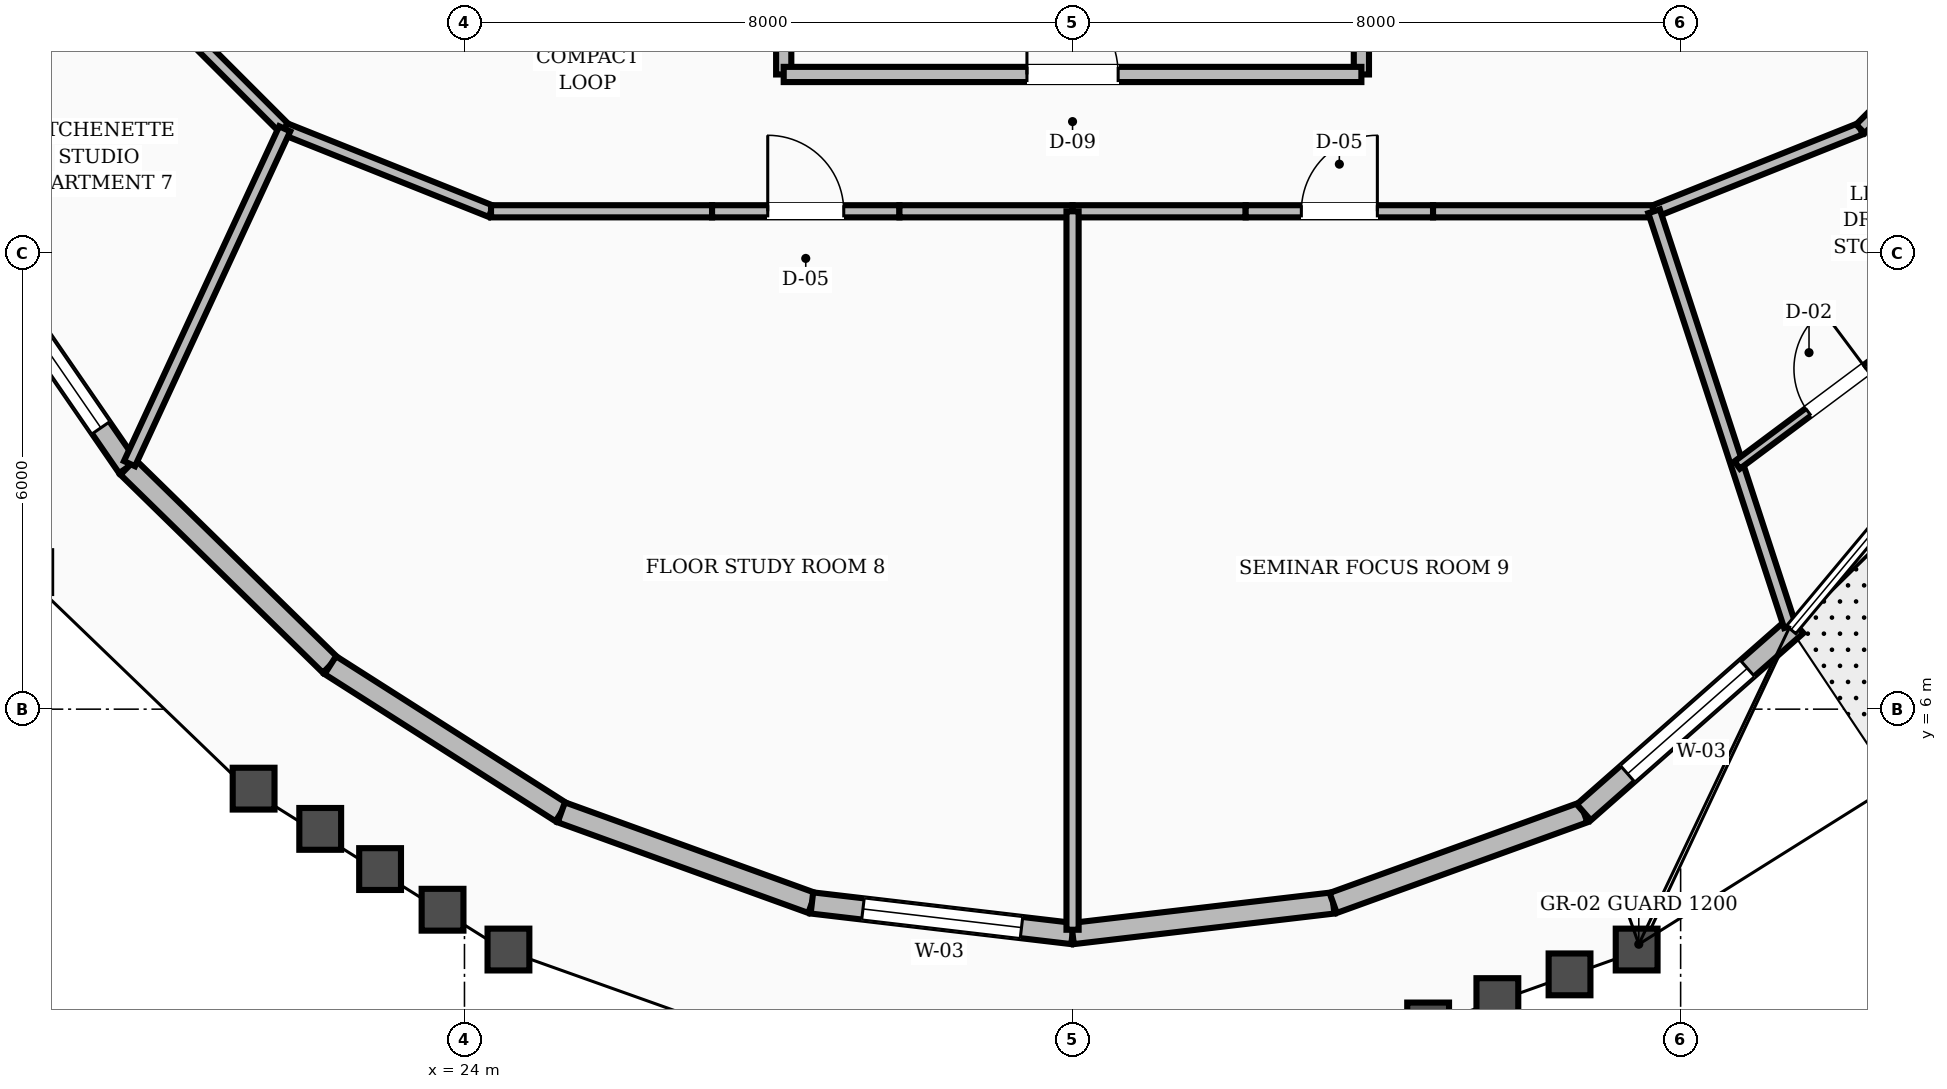
"""IFC4 building model, lengths in metres.
Left out: names, types, materials, properties, quantities, classifications, styles, units other than length and angle.
Written with IfcOpenShell. Run it as: python <this file> out.ifc"""

import sys

from ifc_helpers import new_model, si_unit, direction, frame, frame_2d, origin, place, context, subcontext, project, spatial, rectangle, extrude, element, fill, save


model = new_model("IFC4")
c1 = context("Model", 3, precision=1e-05, world=origin(), true_north=direction((0.0, 1.0)))
c2 = subcontext(c1, "Body", "Model", "MODEL_VIEW")
j1 = project(units=[si_unit("LENGTHUNIT", "METRE"), si_unit("PLANEANGLEUNIT", "RADIAN")], contexts=[c1])
p1 = place(None, origin())
s1 = spatial("IfcSite", under=j1, at=p1, CompositionType="ELEMENT")
p2 = place(p1, origin())
s2 = spatial("IfcBuilding", under=s1, at=p2, CompositionType="ELEMENT")
p3 = place(p2, frame((0.0, 0.0, 294.0)))
s3 = spatial("IfcBuildingStorey", under=s2, at=p3, CompositionType="ELEMENT", Elevation=294.0)
p4 = place(p3, frame((17.386, 12.36, 0.0), z_axis=(0.0, 0.0, 1.0), x_axis=(0.567090463347, -0.823655514388, 0.0)))
e1 = element("IfcWall", 1, at=p4, inside=s3, PredefinedType="STANDARD", context=c2, shape_type="SweptSolid", body=[
    extrude(rectangle(XDim=3.855, YDim=0.28, at=frame_2d((1.927, 0.0))), origin(), (0.0, 0.0, 1.0), 2.82),
])
p5 = place(p4, frame((0.627, 0.0, 0.8)))
e2 = element("IfcOpeningElement", 2, at=p5, cuts=e1, PredefinedType="OPENING", context=c2, shape_type="SweptSolid", body=[
    extrude(rectangle(XDim=2.6, YDim=1.65, at=frame_2d((1.3, 0.825))), frame((0.0, 0.15, 0.0), z_axis=(0.0, -1.0, 0.0), x_axis=(1.0, 0.0, 0.0)), (0.0, 0.0, 1.0), 0.3),
])
p6 = place(p3, frame((19.572, 9.185, 0.0), z_axis=(0.0, 0.0, 1.0), x_axis=(0.714829041056, -0.699299250724, 0.0)))
e3 = element("IfcWall", 3, at=p6, inside=s3, PredefinedType="STANDARD", context=c2, shape_type="SweptSolid", body=[
    extrude(rectangle(XDim=3.726, YDim=0.28, at=frame_2d((1.863, 0.0))), origin(), (0.0, 0.0, 1.0), 2.82),
])
p7 = place(p3, frame((22.235, 6.579, 0.0), z_axis=(0.0, 0.0, 1.0), x_axis=(0.843329306989, -0.537397134319, 0.0)))
e4 = element("IfcWall", 4, at=p7, inside=s3, PredefinedType="STANDARD", context=c2, shape_type="SweptSolid", body=[
    extrude(rectangle(XDim=3.603, YDim=0.28, at=frame_2d((1.802, 0.0))), origin(), (0.0, 0.0, 1.0), 2.82),
])
p8 = place(p3, frame((25.274, 4.643, 0.0), z_axis=(0.0, 0.0, 1.0), x_axis=(0.940393758193, -0.340087605703, 0.0)))
e5 = element("IfcWall", 5, at=p8, inside=s3, PredefinedType="STANDARD", context=c2, shape_type="SweptSolid", body=[
    extrude(rectangle(XDim=3.506, YDim=0.28, at=frame_2d((1.753, 0.0))), origin(), (0.0, 0.0, 1.0), 2.82),
])
p9 = place(p3, frame((28.571, 3.45, 0.0), z_axis=(0.0, 0.0, 1.0), x_axis=(0.993178090084, -0.116607381314, 0.0)))
e6 = element("IfcWall", 6, at=p9, inside=s3, PredefinedType="STANDARD", context=c2, shape_type="SweptSolid", body=[
    extrude(rectangle(XDim=3.452, YDim=0.28, at=frame_2d((1.726, 0.0))), origin(), (0.0, 0.0, 1.0), 2.82),
])
p10 = place(p9, frame((0.676, 0.0, 0.8)))
e7 = element("IfcOpeningElement", 7, at=p10, cuts=e6, PredefinedType="OPENING", context=c2, shape_type="SweptSolid", body=[
    extrude(rectangle(XDim=2.1, YDim=1.65, at=frame_2d((1.05, 0.825))), frame((0.0, 0.15, 0.0), z_axis=(0.0, -1.0, 0.0), x_axis=(1.0, 0.0, 0.0)), (0.0, 0.0, 1.0), 0.3),
])
p11 = place(p3, frame((32.0, 3.048, 0.0), z_axis=(0.0, 0.0, 1.0), x_axis=(0.993178090084, 0.116607381314, 0.0)))
e8 = element("IfcWall", 8, at=p11, inside=s3, PredefinedType="STANDARD", context=c2, shape_type="SweptSolid", body=[
    extrude(rectangle(XDim=3.452, YDim=0.28, at=frame_2d((1.726, 0.0))), origin(), (0.0, 0.0, 1.0), 2.82),
])
p12 = place(p3, frame((35.429, 3.45, 0.0), z_axis=(0.0, 0.0, 1.0), x_axis=(0.940393758193, 0.340087605703, 0.0)))
e9 = element("IfcWall", 9, at=p12, inside=s3, PredefinedType="STANDARD", context=c2, shape_type="SweptSolid", body=[
    extrude(rectangle(XDim=3.506, YDim=0.28, at=frame_2d((1.753, 0.0))), origin(), (0.0, 0.0, 1.0), 2.82),
])
p13 = place(p3, frame((38.726, 4.643, 0.0), z_axis=(0.0, 0.0, 1.0), x_axis=(0.75049902536, 0.660871555549, 0.0)))
e10 = element("IfcWall", 10, at=p13, inside=s3, PredefinedType="STANDARD", context=c2, shape_type="SweptSolid", body=[
    extrude(rectangle(XDim=3.726, YDim=0.28, at=frame_2d((1.863, 0.0))), origin(), (0.0, 0.0, 1.0), 2.82),
])
p14 = place(p13, frame((0.767, 0.0, 0.8)))
e11 = element("IfcOpeningElement", 11, at=p14, cuts=e10, PredefinedType="OPENING", context=c2, shape_type="SweptSolid", body=[
    extrude(rectangle(XDim=2.1, YDim=1.65, at=frame_2d((1.05, 0.825))), frame((0.0, 0.15, 0.0), z_axis=(0.0, -1.0, 0.0), x_axis=(1.0, 0.0, 0.0)), (0.0, 0.0, 1.0), 0.3),
])
for number, where, z_axis, x_axis in (
    (12, (28.2, 14.35, 0.0), (0.0, 0.0, 1.0), (0.0, 1.0, 0.0)),
    (13, (35.8, 14.35, 0.0), (0.0, 0.0, 1.0), (0.0, 1.0, 0.0)),
):
    element("IfcWall", number, at=place(p3, frame(where, z_axis=z_axis, x_axis=x_axis)), inside=s3, PredefinedType="SOLIDWALL", context=c2, shape_type="SweptSolid", body=[
        extrude(rectangle(XDim=2.2, YDim=0.2, at=frame_2d((1.1, 0.0))), origin(), (0.0, 0.0, 1.0), 2.81),
    ])
p15 = place(p3, frame((28.2, 14.35, 0.0), z_axis=(0.0, 0.0, 1.0), x_axis=(1.0, 0.0, 0.0)))
e14 = element("IfcWall", 14, at=p15, inside=s3, PredefinedType="SOLIDWALL", context=c2, shape_type="SweptSolid", body=[
    extrude(rectangle(XDim=7.6, YDim=0.2, at=frame_2d((3.8, 0.0))), origin(), (0.0, 0.0, 1.0), 2.81),
])
p16 = place(p15, frame((3.2, 0.0, 0.0)))
e15 = element("IfcOpeningElement", 15, at=p16, cuts=e14, PredefinedType="OPENING", context=c2, shape_type="SweptSolid", body=[
    extrude(rectangle(XDim=1.2, YDim=2.1, at=frame_2d((0.6, 1.05))), frame((0.0, 0.11, 0.0), z_axis=(0.0, -1.0, 0.0), x_axis=(1.0, 0.0, 0.0)), (0.0, 0.0, 1.0), 0.22),
])
p17 = place(p3, frame((19.573, 15.697, 0.0), z_axis=(0.0, 0.0, 1.0), x_axis=(0.707106781187, -0.707106781187, 0.0)))
e16 = element("IfcWall", 16, at=p17, inside=s3, PredefinedType="SOLIDWALL", context=c2, shape_type="SweptSolid", body=[
    extrude(rectangle(XDim=2.916, YDim=0.16, at=frame_2d((1.458, 0.0))), origin(), (0.0, 0.0, 1.0), 2.81),
])
p18 = place(p3, frame((21.635, 13.635, 0.0), z_axis=(0.0, 0.0, 1.0), x_axis=(0.92856882165, -0.371160266542, 0.0)))
e17 = element("IfcWall", 17, at=p18, inside=s3, PredefinedType="SOLIDWALL", context=c2, shape_type="SweptSolid", body=[
    extrude(rectangle(XDim=2.923, YDim=0.16, at=frame_2d((1.461, 0.0))), origin(), (0.0, 0.0, 1.0), 2.81),
])
p19 = place(p3, frame((24.349, 12.55, 0.0), z_axis=(0.0, 0.0, 1.0), x_axis=(1.0, 0.0, 0.0)))
e18 = element("IfcWall", 18, at=p19, inside=s3, PredefinedType="SOLIDWALL", context=c2, shape_type="SweptSolid", body=[
    extrude(rectangle(XDim=2.908, YDim=0.16, at=frame_2d((1.454, 0.0))), origin(), (0.0, 0.0, 1.0), 2.81),
])
p20 = place(p3, frame((27.257, 12.55, 0.0), z_axis=(0.0, 0.0, 1.0), x_axis=(1.0, 0.0, 0.0)))
e19 = element("IfcWall", 19, at=p20, inside=s3, PredefinedType="SOLIDWALL", context=c2, shape_type="SweptSolid", body=[
    extrude(rectangle(XDim=2.465, YDim=0.16, at=frame_2d((1.232, 0.0))), origin(), (0.0, 0.0, 1.0), 2.81),
])
p21 = place(p20, frame((0.733, 0.0, 0.0)))
e20 = element("IfcOpeningElement", 20, at=p21, cuts=e19, PredefinedType="OPENING", context=c2, shape_type="SweptSolid", body=[
    extrude(rectangle(XDim=1.0, YDim=2.1, at=frame_2d((0.5, 1.05))), frame((0.0, 0.09, 0.0), z_axis=(0.0, -1.0, 0.0), x_axis=(1.0, 0.0, 0.0)), (0.0, 0.0, 1.0), 0.18),
])
for number, where, z_axis, x_axis in (
    (21, (29.722, 12.55, 0.0), (0.0, 0.0, 1.0), (1.0, 0.0, 0.0)),
    (22, (32.0, 12.55, 0.0), (0.0, 0.0, 1.0), (1.0, 0.0, 0.0)),
):
    element("IfcWall", number, at=place(p3, frame(where, z_axis=z_axis, x_axis=x_axis)), inside=s3, PredefinedType="SOLIDWALL", context=c2, shape_type="SweptSolid", body=[
        extrude(rectangle(XDim=2.278, YDim=0.16, at=frame_2d((1.139, 0.0))), origin(), (0.0, 0.0, 1.0), 2.81),
    ])
p22 = place(p3, frame((34.278, 12.55, 0.0), z_axis=(0.0, 0.0, 1.0), x_axis=(1.0, 0.0, 0.0)))
e23 = element("IfcWall", 23, at=p22, inside=s3, PredefinedType="SOLIDWALL", context=c2, shape_type="SweptSolid", body=[
    extrude(rectangle(XDim=2.465, YDim=0.16, at=frame_2d((1.232, 0.0))), origin(), (0.0, 0.0, 1.0), 2.81),
])
p23 = place(p22, frame((0.733, 0.0, 0.0)))
e24 = element("IfcOpeningElement", 24, at=p23, cuts=e23, PredefinedType="OPENING", context=c2, shape_type="SweptSolid", body=[
    extrude(rectangle(XDim=1.0, YDim=2.1, at=frame_2d((0.5, 1.05))), frame((0.0, 0.09, 0.0), z_axis=(0.0, -1.0, 0.0), x_axis=(1.0, 0.0, 0.0)), (0.0, 0.0, 1.0), 0.18),
])
p24 = place(p3, frame((36.743, 12.55, 0.0), z_axis=(0.0, 0.0, 1.0), x_axis=(1.0, 0.0, 0.0)))
e25 = element("IfcWall", 25, at=p24, inside=s3, PredefinedType="SOLIDWALL", context=c2, shape_type="SweptSolid", body=[
    extrude(rectangle(XDim=2.908, YDim=0.16, at=frame_2d((1.454, 0.0))), origin(), (0.0, 0.0, 1.0), 2.81),
])
p25 = place(p3, frame((39.651, 12.55, 0.0), z_axis=(0.0, 0.0, 1.0), x_axis=(0.92856882165, 0.371160266542, 0.0)))
e26 = element("IfcWall", 26, at=p25, inside=s3, PredefinedType="SOLIDWALL", context=c2, shape_type="SweptSolid", body=[
    extrude(rectangle(XDim=2.923, YDim=0.16, at=frame_2d((1.461, 0.0))), origin(), (0.0, 0.0, 1.0), 2.81),
])
p26 = place(p3, frame((42.365, 13.635, 0.0), z_axis=(0.0, 0.0, 1.0), x_axis=(0.707106781187, 0.707106781187, 0.0)))
e27 = element("IfcWall", 27, at=p26, inside=s3, PredefinedType="SOLIDWALL", context=c2, shape_type="SweptSolid", body=[
    extrude(rectangle(XDim=2.916, YDim=0.16, at=frame_2d((1.458, 0.0))), origin(), (0.0, 0.0, 1.0), 2.81),
])
p27 = place(p26, frame((0.983, 0.0, 0.0)))
e28 = element("IfcOpeningElement", 28, at=p27, cuts=e27, PredefinedType="OPENING", context=c2, shape_type="SweptSolid", body=[
    extrude(rectangle(XDim=0.95, YDim=2.1, at=frame_2d((0.475, 1.05))), frame((0.0, 0.09, 0.0), z_axis=(0.0, -1.0, 0.0), x_axis=(1.0, 0.0, 0.0)), (0.0, 0.0, 1.0), 0.18),
])
p28 = place(p3, frame((21.635, 13.635, 0.0), z_axis=(0.0, 0.0, 1.0), x_axis=(-0.420569037513, -0.907260538481, 0.0)))
e29 = element("IfcWall", 29, at=p28, inside=s3, PredefinedType="SOLIDWALL", context=c2, shape_type="SweptSolid", body=[
    extrude(rectangle(XDim=4.855, YDim=0.16, at=frame_2d((2.428, 0.0))), origin(), (0.0, 0.0, 1.0), 2.81),
])
p29 = place(p3, frame((32.0, 12.55, 0.0), z_axis=(0.0, 0.0, 1.0), x_axis=(0.0, -1.0, 0.0)))
e30 = element("IfcWall", 30, at=p29, inside=s3, PredefinedType="SOLIDWALL", context=c2, shape_type="SweptSolid", body=[
    extrude(rectangle(XDim=9.452, YDim=0.16, at=frame_2d((4.726, 0.0))), origin(), (0.0, 0.0, 1.0), 2.81),
])
p30 = place(p3, frame((39.651, 12.55, 0.0), z_axis=(0.0, 0.0, 1.0), x_axis=(0.311211491999, -0.950340679571, 0.0)))
e31 = element("IfcWall", 31, at=p30, inside=s3, PredefinedType="SOLIDWALL", context=c2, shape_type="SweptSolid", body=[
    extrude(rectangle(XDim=5.743, YDim=0.16, at=frame_2d((2.872, 0.0))), origin(), (0.0, 0.0, 1.0), 2.81),
])
p31 = place(p3, frame((40.744, 9.211, 0.0), z_axis=(0.0, 0.0, 1.0), x_axis=(0.801344832449, 0.598202690989, 0.0)))
e32 = element("IfcWall", 32, at=p31, inside=s3, PredefinedType="PARTITIONING", context=c2, shape_type="SweptSolid", body=[
    extrude(rectangle(XDim=3.285, YDim=0.12, at=frame_2d((1.642, 0.0))), origin(), (0.0, 0.0, 1.0), 2.81),
])
p32 = place(p31, frame((1.167, 0.0, 0.0)))
e33 = element("IfcOpeningElement", 33, at=p32, cuts=e32, PredefinedType="OPENING", context=c2, shape_type="SweptSolid", body=[
    extrude(rectangle(XDim=0.95, YDim=2.1, at=frame_2d((0.475, 1.05))), frame((0.0, 0.07, 0.0), z_axis=(0.0, -1.0, 0.0), x_axis=(1.0, 0.0, 0.0)), (0.0, 0.0, 1.0), 0.14),
])
p33 = place(p5, origin())
e34 = element("IfcWindow", 34, at=p33, inside=s3, PartitioningType="SINGLE_PANEL", PredefinedType="WINDOW", context=c2, shape_type="SweptSolid", body=[
    extrude(rectangle(XDim=2.6, YDim=1.65, at=frame_2d((1.3, 0.825))), frame((0.0, 0.03, 0.0), z_axis=(0.0, -1.0, 0.0), x_axis=(1.0, 0.0, 0.0)), (0.0, 0.0, 1.0), 0.06),
])
fill(e2, e34)
p34 = place(p10, origin())
e35 = element("IfcWindow", 35, at=p34, inside=s3, PartitioningType="SINGLE_PANEL", PredefinedType="WINDOW", context=c2, shape_type="SweptSolid", body=[
    extrude(rectangle(XDim=2.1, YDim=1.65, at=frame_2d((1.05, 0.825))), frame((0.0, 0.03, 0.0), z_axis=(0.0, -1.0, 0.0), x_axis=(1.0, 0.0, 0.0)), (0.0, 0.0, 1.0), 0.06),
])
fill(e7, e35)
p35 = place(p14, origin())
e36 = element("IfcWindow", 36, at=p35, inside=s3, PartitioningType="SINGLE_PANEL", PredefinedType="WINDOW", context=c2, shape_type="SweptSolid", body=[
    extrude(rectangle(XDim=2.1, YDim=1.65, at=frame_2d((1.05, 0.825))), frame((0.0, 0.03, 0.0), z_axis=(0.0, -1.0, 0.0), x_axis=(1.0, 0.0, 0.0)), (0.0, 0.0, 1.0), 0.06),
])
fill(e11, e36)
p36 = place(p16, origin())
e37 = element("IfcDoor", 37, at=p36, inside=s3, OperationType="SINGLE_SWING_LEFT", PredefinedType="DOOR", context=c2, shape_type="SweptSolid", body=[
    extrude(rectangle(XDim=1.2, YDim=2.1, at=frame_2d((0.6, 1.05))), frame((0.0, 0.025, 0.0), z_axis=(0.0, -1.0, 0.0), x_axis=(1.0, 0.0, 0.0)), (0.0, 0.0, 1.0), 0.05),
])
fill(e15, e37)
p37 = place(p21, origin())
e38 = element("IfcDoor", 38, at=p37, inside=s3, OperationType="SINGLE_SWING_LEFT", PredefinedType="DOOR", context=c2, shape_type="SweptSolid", body=[
    extrude(rectangle(XDim=1.0, YDim=2.1, at=frame_2d((0.5, 1.05))), frame((0.0, 0.025, 0.0), z_axis=(0.0, -1.0, 0.0), x_axis=(1.0, 0.0, 0.0)), (0.0, 0.0, 1.0), 0.05),
])
fill(e20, e38)
p38 = place(p23, origin())
e39 = element("IfcDoor", 39, at=p38, inside=s3, OperationType="SINGLE_SWING_RIGHT", PredefinedType="DOOR", context=c2, shape_type="SweptSolid", body=[
    extrude(rectangle(XDim=1.0, YDim=2.1, at=frame_2d((0.5, 1.05))), frame((0.0, 0.025, 0.0), z_axis=(0.0, -1.0, 0.0), x_axis=(1.0, 0.0, 0.0)), (0.0, 0.0, 1.0), 0.05),
])
fill(e24, e39)
p39 = place(p32, origin())
e40 = element("IfcDoor", 40, at=p39, inside=s3, OperationType="SINGLE_SWING_RIGHT", PredefinedType="DOOR", context=c2, shape_type="SweptSolid", body=[
    extrude(rectangle(XDim=0.95, YDim=2.1, at=frame_2d((0.475, 1.05))), frame((0.0, 0.025, 0.0), z_axis=(0.0, -1.0, 0.0), x_axis=(1.0, 0.0, 0.0)), (0.0, 0.0, 1.0), 0.05),
])
fill(e33, e40)
save(model, sys.argv[1])
